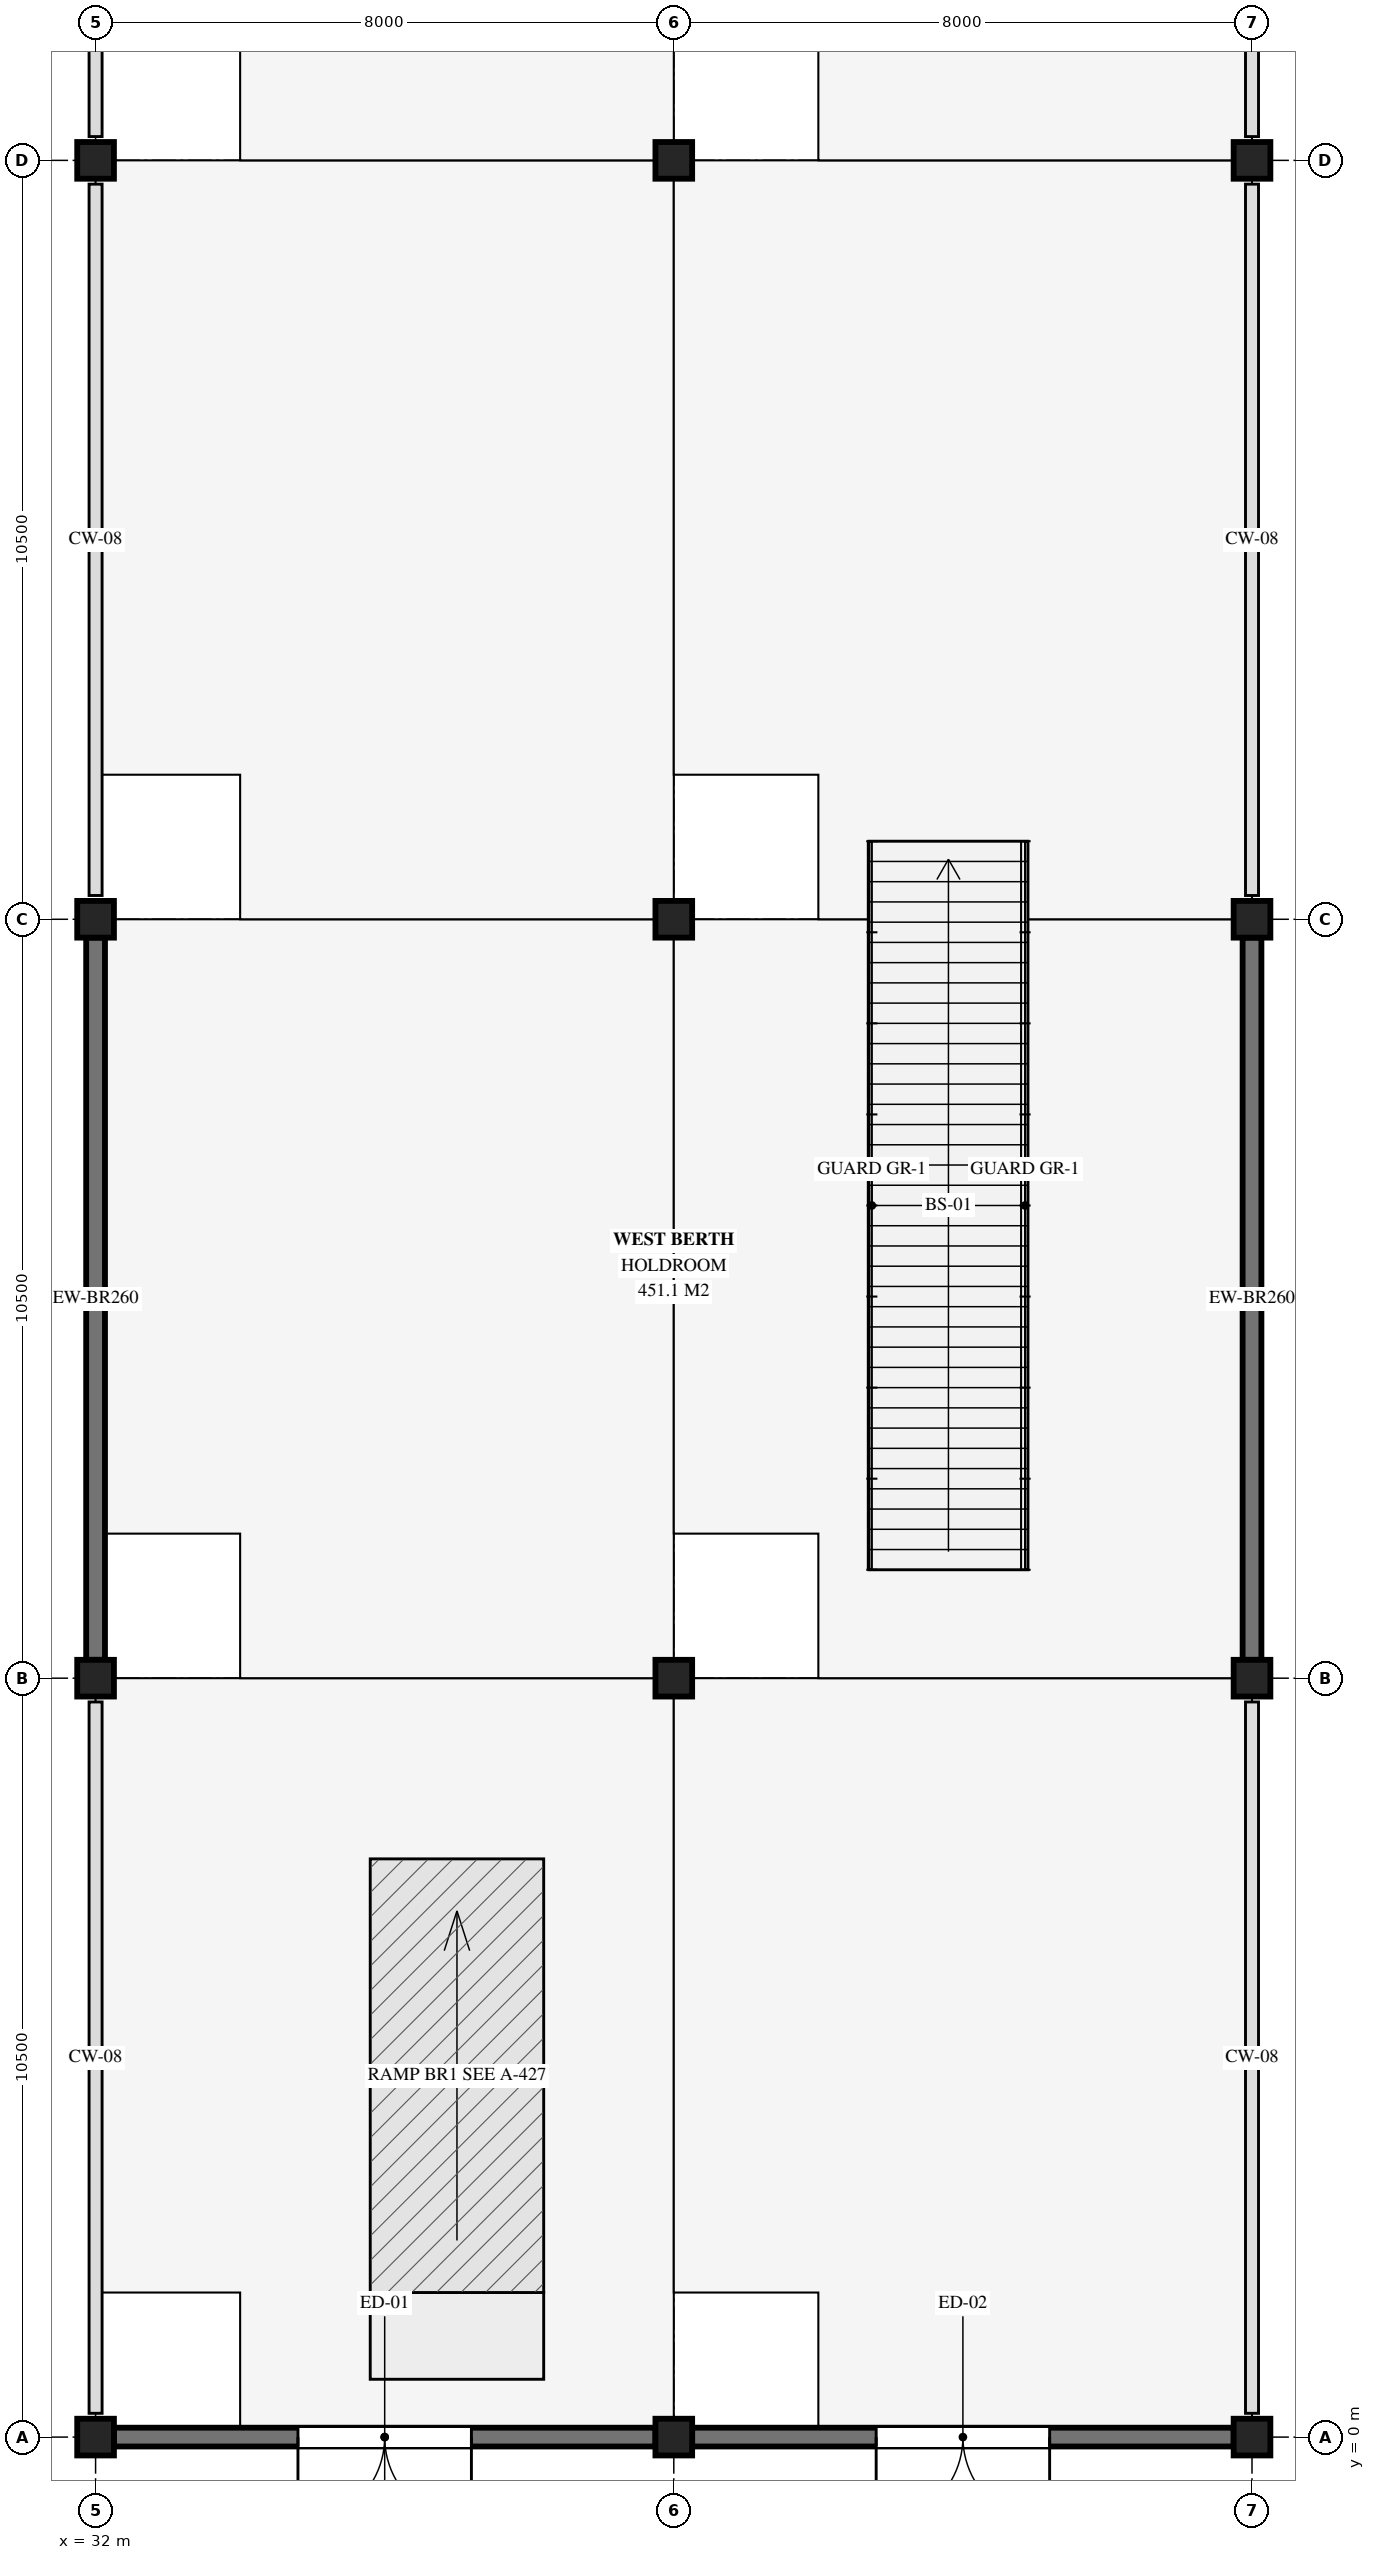
"""IFC4 building model, lengths in metres.
Left out: names, types, materials, properties, quantities, classifications, styles, units other than length and angle.
Written with IfcOpenShell. Run it as: python <this file> out.ifc"""

import sys

from ifc_helpers import new_model, si_unit, direction, frame, frame_2d, origin, origin_2d, place, context, subcontext, project, spatial, rectangle, hollow_circle, extrude, element, fill, save


model = new_model("IFC4")
c1 = context("Model", 3, precision=1e-05, world=origin(), true_north=direction((0.0, 1.0)))
c2 = subcontext(c1, "Body", "Model", "MODEL_VIEW")
j1 = project(units=[si_unit("LENGTHUNIT", "METRE"), si_unit("PLANEANGLEUNIT", "RADIAN")], contexts=[c1])
p1 = place(None, origin())
s1 = spatial("IfcSite", under=j1, at=p1, CompositionType="ELEMENT")
p2 = place(p1, origin())
s2 = spatial("IfcBuilding", under=s1, at=p2, CompositionType="ELEMENT")
p3 = place(p2, origin())
s3 = spatial("IfcBuildingStorey", under=s2, at=p3, CompositionType="ELEMENT", Elevation=0.0)
for number, where, z_axis, x_axis in (
    (1, (32.0, 0.0, 0.0), (0.0, 0.0, 1.0), (1.0, 0.0, 0.0)),
    (2, (32.0, 10.5, 0.0), (0.0, 0.0, 1.0), (1.0, 0.0, 0.0)),
    (3, (32.0, 21.0, 0.0), (0.0, 0.0, 1.0), (1.0, 0.0, 0.0)),
    (4, (32.0, 31.5, 0.0), (0.0, 0.0, 1.0), (1.0, 0.0, 0.0)),
    (5, (40.0, 0.0, 0.0), (0.0, 0.0, 1.0), (1.0, 0.0, 0.0)),
    (6, (40.0, 10.5, 0.0), (0.0, 0.0, 1.0), (1.0, 0.0, 0.0)),
    (7, (40.0, 21.0, 0.0), (0.0, 0.0, 1.0), (1.0, 0.0, 0.0)),
    (8, (40.0, 31.5, 0.0), (0.0, 0.0, 1.0), (1.0, 0.0, 0.0)),
    (9, (48.0, 0.0, 0.0), (0.0, 0.0, 1.0), (1.0, 0.0, 0.0)),
    (10, (48.0, 10.5, 0.0), (0.0, 0.0, 1.0), (1.0, 0.0, 0.0)),
    (11, (48.0, 21.0, 0.0), (0.0, 0.0, 1.0), (1.0, 0.0, 0.0)),
    (12, (48.0, 31.5, 0.0), (0.0, 0.0, 1.0), (1.0, 0.0, 0.0)),
):
    element("IfcColumn", number, at=place(p3, frame(where, z_axis=z_axis, x_axis=x_axis)), inside=s3, PredefinedType="COLUMN", context=c2, shape_type="SweptSolid", body=[
        extrude(hollow_circle(Radius=0.254, WallThickness=0.02, at=origin_2d()), origin(), (0.0, 0.0, 1.0), 5.24),
    ])
for number, where, z_axis, x_axis in (
    (13, (32.0, 10.754, 0.0), (0.0, 0.0, 1.0), (0.0, 1.0, 0.0)),
    (14, (48.0, 10.754, 0.0), (0.0, 0.0, 1.0), (0.0, 1.0, 0.0)),
):
    element("IfcWall", number, at=place(p3, frame(where, z_axis=z_axis, x_axis=x_axis)), inside=s3, PredefinedType="SOLIDWALL", context=c2, shape_type="SweptSolid", body=[
        extrude(rectangle(XDim=9.992, YDim=0.26, at=frame_2d((4.996, 0.0))), origin(), (0.0, 0.0, 1.0), 5.06),
    ])
p4 = place(p3, frame((39.746, 0.0, 0.0), z_axis=(0.0, 0.0, 1.0), x_axis=(-1.0, 0.0, 0.0)))
e15 = element("IfcWall", 15, at=p4, inside=s3, PredefinedType="SOLIDWALL", context=c2, shape_type="SweptSolid", body=[
    extrude(rectangle(XDim=7.492, YDim=0.26, at=frame_2d((3.746, 0.0))), origin(), (0.0, 0.0, 1.0), 5.06),
])
p5 = place(p4, frame((2.546, 0.0, 0.0)))
e16 = element("IfcOpeningElement", 16, at=p5, cuts=e15, PredefinedType="OPENING", context=c2, shape_type="SweptSolid", body=[
    extrude(rectangle(XDim=2.4, YDim=2.3, at=frame_2d((1.2, 1.15))), frame((0.0, 0.14, 0.0), z_axis=(0.0, -1.0, 0.0), x_axis=(1.0, 0.0, 0.0)), (0.0, 0.0, 1.0), 0.28),
])
p6 = place(p3, frame((47.746, 0.0, 0.0), z_axis=(0.0, 0.0, 1.0), x_axis=(-1.0, 0.0, 0.0)))
e17 = element("IfcWall", 17, at=p6, inside=s3, PredefinedType="SOLIDWALL", context=c2, shape_type="SweptSolid", body=[
    extrude(rectangle(XDim=7.492, YDim=0.26, at=frame_2d((3.746, 0.0))), origin(), (0.0, 0.0, 1.0), 5.06),
])
p7 = place(p6, frame((2.546, 0.0, 0.0)))
e18 = element("IfcOpeningElement", 18, at=p7, cuts=e17, PredefinedType="OPENING", context=c2, shape_type="SweptSolid", body=[
    extrude(rectangle(XDim=2.4, YDim=2.3, at=frame_2d((1.2, 1.15))), frame((0.0, 0.14, 0.0), z_axis=(0.0, -1.0, 0.0), x_axis=(1.0, 0.0, 0.0)), (0.0, 0.0, 1.0), 0.28),
])
p8 = place(p5, origin())
e19 = element("IfcDoor", 19, at=p8, inside=s3, OperationType="DOUBLE_DOOR_SINGLE_SWING", PredefinedType="DOOR", context=c2, shape_type="SweptSolid", body=[
    extrude(rectangle(XDim=2.4, YDim=2.3, at=frame_2d((1.2, 1.15))), frame((0.0, 0.025, 0.0), z_axis=(0.0, -1.0, 0.0), x_axis=(1.0, 0.0, 0.0)), (0.0, 0.0, 1.0), 0.05),
])
fill(e16, e19)
p9 = place(p7, origin())
e20 = element("IfcDoor", 20, at=p9, inside=s3, OperationType="DOUBLE_DOOR_SINGLE_SWING", PredefinedType="DOOR", context=c2, shape_type="SweptSolid", body=[
    extrude(rectangle(XDim=2.4, YDim=2.3, at=frame_2d((1.2, 1.15))), frame((0.0, 0.025, 0.0), z_axis=(0.0, -1.0, 0.0), x_axis=(1.0, 0.0, 0.0)), (0.0, 0.0, 1.0), 0.05),
])
fill(e18, e20)
save(model, sys.argv[1])
